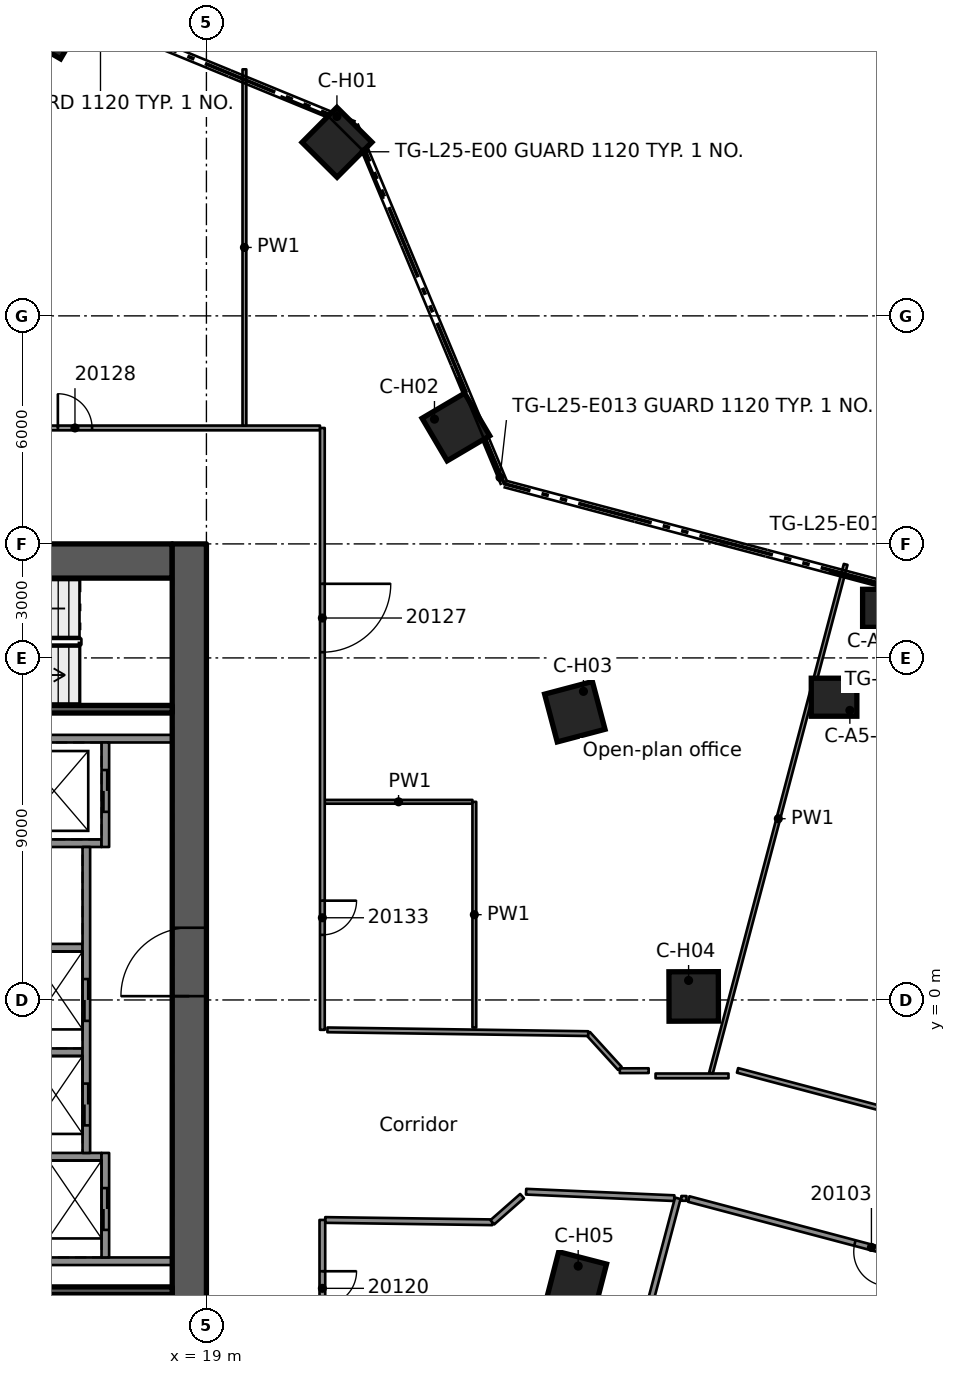
"""IFC4 building model, lengths in metres.
Left out: names, types, materials, properties, quantities, classifications, styles, units other than length and angle.
Written with IfcOpenShell. Run it as: python <this file> out.ifc"""

import sys

from ifc_helpers import new_model, si_unit, direction, frame, frame_2d, origin, origin_2d, place, context, subcontext, project, spatial, rectangle, extrude, element, fill, save


model = new_model("IFC4")
c1 = context("Model", 3, precision=1e-05, world=origin(), true_north=direction((0.0, 1.0)))
c2 = subcontext(c1, "Body", "Model", "MODEL_VIEW")
j1 = project(units=[si_unit("LENGTHUNIT", "METRE"), si_unit("PLANEANGLEUNIT", "RADIAN")], contexts=[c1])
p1 = place(None, origin())
s1 = spatial("IfcSite", under=j1, at=p1, CompositionType="ELEMENT")
p2 = place(p1, origin())
s2 = spatial("IfcBuilding", under=s1, at=p2, CompositionType="ELEMENT")
p3 = place(p2, frame((0.0, 0.0, 102.2)))
s3 = spatial("IfcBuildingStorey", under=s2, at=p3, CompositionType="ELEMENT", Elevation=102.2)
p4 = place(p3, frame((8.9, 11.55, 0.0), z_axis=(0.0, 0.0, 1.0), x_axis=(1.0, 0.0, 0.0)))
e1 = element("IfcWall", 1, at=p4, inside=s3, PredefinedType="SHEAR", context=c2, shape_type="SweptSolid", body=[
    extrude(rectangle(XDim=9.2, YDim=0.9, at=frame_2d((4.6, 0.0))), origin(), (0.0, 0.0, 1.0), 3.5),
])
p5 = place(p4, frame((3.0, 0.0, 0.0)))
e2 = element("IfcOpeningElement", 2, at=p5, cuts=e1, PredefinedType="OPENING", context=c2, shape_type="SweptSolid", body=[
    extrude(rectangle(XDim=1.1, YDim=2.1, at=frame_2d((0.55, 1.05))), frame((0.0, 0.46, 0.0), z_axis=(0.0, -1.0, 0.0), x_axis=(1.0, 0.0, 0.0)), (0.0, 0.0, 1.0), 0.92),
])
p6 = place(p3, frame((18.55, -12.0, 0.0), z_axis=(0.0, 0.0, 1.0), x_axis=(0.0, 1.0, 0.0)))
e3 = element("IfcWall", 3, at=p6, inside=s3, PredefinedType="SHEAR", context=c2, shape_type="SweptSolid", body=[
    extrude(rectangle(XDim=24.0, YDim=0.9, at=frame_2d((12.0, 0.0))), origin(), (0.0, 0.0, 1.0), 3.5),
])
p7 = place(p6, frame((12.1, 0.0, 0.0)))
e4 = element("IfcOpeningElement", 4, at=p7, cuts=e3, PredefinedType="OPENING", context=c2, shape_type="SweptSolid", body=[
    extrude(rectangle(XDim=1.8, YDim=2.1, at=frame_2d((0.9, 1.05))), frame((0.0, 0.46, 0.0), z_axis=(0.0, -1.0, 0.0), x_axis=(1.0, 0.0, 0.0)), (0.0, 0.0, 1.0), 0.92),
])
for number, where, z_axis, x_axis in (
    (5, (36.867, 10.305, 0.0), (0.0, 0.0, 1.0), (1.0, 0.0, 0.0)),
    (6, (35.516, 7.966, 0.0), (0.0, 0.0, 1.0), (1.0, 0.0, 0.0)),
):
    element("IfcColumn", number, at=place(p3, frame(where, z_axis=z_axis, x_axis=x_axis)), inside=s3, PredefinedType="COLUMN", context=c2, shape_type="SweptSolid", body=[
        extrude(rectangle(XDim=1.2, YDim=1.0, at=origin_2d()), origin(), (0.0, 0.0, 1.0), 3.5),
    ])
for number, where, z_axis, x_axis in (
    (7, (22.436, 22.567, 0.0), (0.0, 0.0, 1.0), (0.705, 0.709, 0.0)),
    (8, (25.565, 15.076, 0.0), (0.0, 0.0, 1.0), (0.861, 0.508, 0.0)),
    (9, (28.694, 7.584, 0.0), (0.0, 0.0, 1.0), (0.967, 0.256, 0.0)),
    (10, (31.822, 0.093, 0.0), (0.0, 0.0, 1.0), (1.0, 0.003, 0.0)),
    (11, (28.737, -7.417, 0.0), (0.0, 0.0, 1.0), (0.968, -0.25, 0.0)),
    (12, (14.927, 25.652, 0.0), (0.0, 0.0, 1.0), (0.503, 0.864, 0.0)),
):
    element("IfcColumn", number, at=place(p3, frame(where, z_axis=z_axis, x_axis=x_axis)), inside=s3, PredefinedType="COLUMN", context=c2, shape_type="SweptSolid", body=[
        extrude(rectangle(XDim=1.3, YDim=1.3, at=origin_2d()), origin(), (0.0, 0.0, 1.0), 3.5),
    ])
for number, where, z_axis, x_axis in (
    (13, (11.54, -6.875, 0.0), (0.0, 0.0, 1.0), (1.0, 0.0, 0.0)),
    (14, (11.54, 6.875, 0.0), (0.0, 0.0, 1.0), (1.0, 0.0, 0.0)),
):
    element("IfcWall", number, at=place(p3, frame(where, z_axis=z_axis, x_axis=x_axis)), inside=s3, PredefinedType="SOLIDWALL", context=c2, shape_type="SweptSolid", body=[
        extrude(rectangle(XDim=6.56, YDim=0.2, at=frame_2d((3.28, 0.0))), origin(), (0.0, 0.0, 1.0), 3.09),
    ])
p8 = place(p3, frame((11.54, 4.125, 0.0), z_axis=(0.0, 0.0, 1.0), x_axis=(1.0, 0.0, 0.0)))
e15 = element("IfcWall", 15, at=p8, inside=s3, PredefinedType="SOLIDWALL", context=c2, shape_type="SweptSolid", body=[
    extrude(rectangle(XDim=4.7, YDim=0.2, at=frame_2d((2.35, 0.0))), origin(), (0.0, 0.0, 1.0), 3.09),
])
for number, where, z_axis, x_axis in (
    (16, (11.54, 1.375, 0.0), (0.0, 0.0, 1.0), (1.0, 0.0, 0.0)),
    (17, (11.54, -1.375, 0.0), (0.0, 0.0, 1.0), (1.0, 0.0, 0.0)),
):
    element("IfcWall", number, at=place(p3, frame(where, z_axis=z_axis, x_axis=x_axis)), inside=s3, PredefinedType="SOLIDWALL", context=c2, shape_type="SweptSolid", body=[
        extrude(rectangle(XDim=4.2, YDim=0.2, at=frame_2d((2.1, 0.0))), origin(), (0.0, 0.0, 1.0), 3.09),
    ])
p9 = place(p3, frame((11.54, -4.125, 0.0), z_axis=(0.0, 0.0, 1.0), x_axis=(1.0, 0.0, 0.0)))
e18 = element("IfcWall", 18, at=p9, inside=s3, PredefinedType="SOLIDWALL", context=c2, shape_type="SweptSolid", body=[
    extrude(rectangle(XDim=4.7, YDim=0.2, at=frame_2d((2.35, 0.0))), origin(), (0.0, 0.0, 1.0), 3.09),
])
p10 = place(p3, frame((16.34, 6.775, 0.0), z_axis=(0.0, 0.0, 1.0), x_axis=(0.0, -1.0, 0.0)))
e19 = element("IfcWall", 19, at=p10, inside=s3, PredefinedType="SOLIDWALL", context=c2, shape_type="SweptSolid", body=[
    extrude(rectangle(XDim=2.75, YDim=0.2, at=frame_2d((1.375, 0.0))), origin(), (0.0, 0.0, 1.0), 3.09),
])
p11 = place(p10, frame((0.725, 0.0, 0.0)))
e20 = element("IfcOpeningElement", 20, at=p11, cuts=e19, PredefinedType="OPENING", context=c2, shape_type="SweptSolid", body=[
    extrude(rectangle(XDim=1.1, YDim=2.1, at=frame_2d((0.55, 1.05))), frame((0.0, 0.11, 0.0), z_axis=(0.0, -1.0, 0.0), x_axis=(1.0, 0.0, 0.0)), (0.0, 0.0, 1.0), 0.22),
])
p12 = place(p3, frame((15.84, 4.025, 0.0), z_axis=(0.0, 0.0, 1.0), x_axis=(0.0, -1.0, 0.0)))
e21 = element("IfcWall", 21, at=p12, inside=s3, PredefinedType="SOLIDWALL", context=c2, shape_type="SweptSolid", body=[
    extrude(rectangle(XDim=8.05, YDim=0.2, at=frame_2d((4.025, 0.0))), origin(), (0.0, 0.0, 1.0), 3.09),
])
p13 = place(p12, frame((3.475, 0.0, 0.0)))
e22 = element("IfcOpeningElement", 22, at=p13, cuts=e21, PredefinedType="OPENING", context=c2, shape_type="SweptSolid", body=[
    extrude(rectangle(XDim=1.1, YDim=2.1, at=frame_2d((0.55, 1.05))), frame((0.0, 0.11, 0.0), z_axis=(0.0, -1.0, 0.0), x_axis=(1.0, 0.0, 0.0)), (0.0, 0.0, 1.0), 0.22),
])
p14 = place(p12, frame((6.225, 0.0, 0.0)))
e23 = element("IfcOpeningElement", 23, at=p14, cuts=e21, PredefinedType="OPENING", context=c2, shape_type="SweptSolid", body=[
    extrude(rectangle(XDim=1.1, YDim=2.1, at=frame_2d((0.55, 1.05))), frame((0.0, 0.11, 0.0), z_axis=(0.0, -1.0, 0.0), x_axis=(1.0, 0.0, 0.0)), (0.0, 0.0, 1.0), 0.22),
])
p15 = place(p3, frame((16.34, -4.025, 0.0), z_axis=(0.0, 0.0, 1.0), x_axis=(0.0, -1.0, 0.0)))
e24 = element("IfcWall", 24, at=p15, inside=s3, PredefinedType="SOLIDWALL", context=c2, shape_type="SweptSolid", body=[
    extrude(rectangle(XDim=2.75, YDim=0.2, at=frame_2d((1.375, 0.0))), origin(), (0.0, 0.0, 1.0), 3.09),
])
p16 = place(p15, frame((0.925, 0.0, 0.0)))
e25 = element("IfcOpeningElement", 25, at=p16, cuts=e24, PredefinedType="OPENING", context=c2, shape_type="SweptSolid", body=[
    extrude(rectangle(XDim=1.1, YDim=2.1, at=frame_2d((0.55, 1.05))), frame((0.0, 0.11, 0.0), z_axis=(0.0, -1.0, 0.0), x_axis=(1.0, 0.0, 0.0)), (0.0, 0.0, 1.0), 0.22),
])
for number, where, z_axis, x_axis in (
    (26, (11.54, -7.65, 0.0), (0.0, 0.0, 1.0), (1.0, 0.0, 0.0)),
    (27, (11.54, 7.65, 0.0), (0.0, 0.0, 1.0), (1.0, 0.0, 0.0)),
):
    element("IfcWall", number, at=place(p3, frame(where, z_axis=z_axis, x_axis=x_axis)), inside=s3, PredefinedType="SOLIDWALL", context=c2, shape_type="SweptSolid", body=[
        extrude(rectangle(XDim=6.56, YDim=0.2, at=frame_2d((3.28, 0.0))), origin(), (0.0, 0.0, 1.0), 3.09),
    ])
p17 = place(p3, frame((29.879, -1.8, 0.0), z_axis=(0.0, 0.0, 1.0), x_axis=(-0.673036517664, 0.739609252167, 0.0)))
e28 = element("IfcWall", 28, at=p17, inside=s3, PredefinedType="PARTITIONING", context=c2, shape_type="SweptSolid", body=[
    extrude(rectangle(XDim=1.236, YDim=0.125, at=frame_2d((0.618, 0.0))), origin(), (0.0, 0.0, 1.0), 3.08),
])
p18 = place(p3, frame((52.134, -10.652, 0.0), z_axis=(0.0, 0.0, 1.0), x_axis=(-0.966671200414, 0.25602107392, 0.0)))
e29 = element("IfcWall", 29, at=p18, inside=s3, PredefinedType="PARTITIONING", context=c2, shape_type="SweptSolid", body=[
    extrude(rectangle(XDim=21.147, YDim=0.15, at=frame_2d((10.573, 0.0))), origin(), (0.0, 0.0, 1.0), 3.08),
])
p19 = place(p18, frame((15.724, 0.0, 0.0)))
e30 = element("IfcOpeningElement", 30, at=p19, cuts=e29, PredefinedType="OPENING", context=c2, shape_type="SweptSolid", body=[
    extrude(rectangle(XDim=0.9, YDim=2.1, at=frame_2d((0.45, 1.05))), frame((0.0, 0.085, 0.0), z_axis=(0.0, -1.0, 0.0), x_axis=(1.0, 0.0, 0.0)), (0.0, 0.0, 1.0), 0.17),
])
p20 = place(p18, frame((6.324, 0.0, 0.0)))
e31 = element("IfcOpeningElement", 31, at=p20, cuts=e29, PredefinedType="OPENING", context=c2, shape_type="SweptSolid", body=[
    extrude(rectangle(XDim=0.9, YDim=2.1, at=frame_2d((0.45, 1.05))), frame((0.0, 0.085, 0.0), z_axis=(0.0, -1.0, 0.0), x_axis=(1.0, 0.0, 0.0)), (0.0, 0.0, 1.0), 0.17),
])
p21 = place(p3, frame((32.976, -1.853, 0.0), z_axis=(0.0, 0.0, 1.0), x_axis=(0.966679949131, -0.255988038682, 0.0)))
e32 = element("IfcWall", 32, at=p21, inside=s3, PredefinedType="PARTITIONING", context=c2, shape_type="SweptSolid", body=[
    extrude(rectangle(XDim=24.387, YDim=0.125, at=frame_2d((12.194, 0.0))), origin(), (0.0, 0.0, 1.0), 3.08),
])
p22 = place(p21, frame((3.85, 0.0, 0.0)))
e33 = element("IfcOpeningElement", 33, at=p22, cuts=e32, PredefinedType="OPENING", context=c2, shape_type="SweptSolid", body=[
    extrude(rectangle(XDim=1.8, YDim=2.1, at=frame_2d((0.9, 1.05))), frame((0.0, 0.073, 0.0), z_axis=(0.0, -1.0, 0.0), x_axis=(1.0, 0.0, 0.0)), (0.0, 0.0, 1.0), 0.145),
])
p23 = place(p21, frame((13.499, 0.0, 0.0)))
e34 = element("IfcOpeningElement", 34, at=p23, cuts=e32, PredefinedType="OPENING", context=c2, shape_type="SweptSolid", body=[
    extrude(rectangle(XDim=1.1, YDim=2.1, at=frame_2d((0.55, 1.05))), frame((0.0, 0.073, 0.0), z_axis=(0.0, -1.0, 0.0), x_axis=(1.0, 0.0, 0.0)), (0.0, 0.0, 1.0), 0.145),
])
p24 = place(p3, frame((27.412, -5.045, 0.0), z_axis=(0.0, 0.0, 1.0), x_axis=(0.999048944575, -0.043602824945, 0.0)))
e35 = element("IfcWall", 35, at=p24, inside=s3, PredefinedType="PARTITIONING", context=c2, shape_type="SweptSolid", body=[
    extrude(rectangle(XDim=3.903, YDim=0.15, at=frame_2d((1.951, 0.0))), origin(), (0.0, 0.0, 1.0), 3.08),
])
p25 = place(p3, frame((22.126, -5.789, 0.0), z_axis=(0.0, 0.0, 1.0), x_axis=(0.999903670382, -0.013879839955, 0.0)))
e36 = element("IfcWall", 36, at=p25, inside=s3, PredefinedType="PARTITIONING", context=c2, shape_type="SweptSolid", body=[
    extrude(rectangle(XDim=4.397, YDim=0.15, at=frame_2d((2.199, 0.0))), origin(), (0.0, 0.0, 1.0), 3.08),
])
p26 = place(p3, frame((31.497, -5.22, 0.0), z_axis=(0.0, 0.0, 1.0), x_axis=(0.999895375943, -0.014465032563, 0.0)))
e37 = element("IfcWall", 37, at=p26, inside=s3, PredefinedType="PARTITIONING", context=c2, shape_type="SweptSolid", body=[
    extrude(rectangle(XDim=0.135, YDim=0.125, at=frame_2d((0.067, 0.0))), origin(), (0.0, 0.0, 1.0), 3.08),
])
p27 = place(p3, frame((22.184, -0.787, 0.0), z_axis=(0.0, 0.0, 1.0), x_axis=(0.999896232857, -0.014405676579, 0.0)))
e38 = element("IfcWall", 38, at=p27, inside=s3, PredefinedType="PARTITIONING", context=c2, shape_type="SweptSolid", body=[
    extrude(rectangle(XDim=6.864, YDim=0.125, at=frame_2d((3.432, 0.0))), origin(), (0.0, 0.0, 1.0), 3.08),
])
p28 = place(p3, frame((30.819, -1.998, 0.0), z_axis=(0.0, 0.0, 1.0), x_axis=(1.0, 0.0, 0.0)))
e39 = element("IfcWall", 39, at=p28, inside=s3, PredefinedType="PARTITIONING", context=c2, shape_type="SweptSolid", body=[
    extrude(rectangle(XDim=1.919, YDim=0.125, at=frame_2d((0.959, 0.0))), origin(), (0.0, 0.0, 1.0), 3.08),
])
p29 = place(p3, frame((22.113, 5.214, 0.0), z_axis=(0.0, 0.0, 1.0), x_axis=(1.0, 0.0, 0.0)))
e40 = element("IfcWall", 40, at=p29, inside=s3, PredefinedType="PARTITIONING", context=c2, shape_type="SweptSolid", body=[
    extrude(rectangle(XDim=3.886, YDim=0.1, at=frame_2d((1.943, 0.0))), origin(), (0.0, 0.0, 1.0), 3.08),
])
p30 = place(p3, frame((10.991, 15.051, 0.0), z_axis=(0.0, 0.0, 1.0), x_axis=(1.0, 0.0, 0.0)))
e41 = element("IfcWall", 41, at=p30, inside=s3, PredefinedType="PARTITIONING", context=c2, shape_type="SweptSolid", body=[
    extrude(rectangle(XDim=10.997, YDim=0.125, at=frame_2d((5.499, 0.0))), origin(), (0.0, 0.0, 1.0), 3.08),
])
p31 = place(p30, frame((4.1, 0.0, 0.0)))
e42 = element("IfcOpeningElement", 42, at=p31, cuts=e41, PredefinedType="OPENING", context=c2, shape_type="SweptSolid", body=[
    extrude(rectangle(XDim=0.9, YDim=2.1, at=frame_2d((0.45, 1.05))), frame((0.0, 0.073, 0.0), z_axis=(0.0, -1.0, 0.0), x_axis=(1.0, 0.0, 0.0)), (0.0, 0.0, 1.0), 0.145),
])
p32 = place(p3, frame((29.878, -1.862, 0.0), z_axis=(0.0, 0.0, 1.0), x_axis=(0.999996689403, 0.002573166135, 0.0)))
e43 = element("IfcWall", 43, at=p32, inside=s3, PredefinedType="PARTITIONING", context=c2, shape_type="SweptSolid", body=[
    extrude(rectangle(XDim=0.759, YDim=0.125, at=frame_2d((0.379, 0.0))), origin(), (0.0, 0.0, 1.0), 3.08),
])
p33 = place(p3, frame((29.858, -11.053, 0.0), z_axis=(0.0, 0.0, 1.0), x_axis=(0.256179404859, 0.966629252882, 0.0)))
e44 = element("IfcWall", 44, at=p33, inside=s3, PredefinedType="PARTITIONING", context=c2, shape_type="SweptSolid", body=[
    extrude(rectangle(XDim=6.035, YDim=0.15, at=frame_2d((3.018, 0.0))), origin(), (0.0, 0.0, 1.0), 3.08),
])
p34 = place(p3, frame((32.277, -1.923, 0.0), z_axis=(0.0, 0.0, 1.0), x_axis=(0.255967683611, 0.96668533916, 0.0)))
e45 = element("IfcWall", 45, at=p34, inside=s3, PredefinedType="PARTITIONING", context=c2, shape_type="SweptSolid", body=[
    extrude(rectangle(XDim=13.845, YDim=0.1, at=frame_2d((6.923, 0.0))), origin(), (0.0, 0.0, 1.0), 3.08),
])
p35 = place(p3, frame((26.523, -5.85, 0.0), z_axis=(0.0, 0.0, 1.0), x_axis=(0.750616003207, 0.660738689446, 0.0)))
e46 = element("IfcWall", 46, at=p35, inside=s3, PredefinedType="PARTITIONING", context=c2, shape_type="SweptSolid", body=[
    extrude(rectangle(XDim=1.043, YDim=0.15, at=frame_2d((0.521, 0.0))), origin(), (0.0, 0.0, 1.0), 3.08),
])
p36 = place(p3, frame((26.05, -0.725, 0.0), z_axis=(0.0, 0.0, 1.0), x_axis=(0.0, 1.0, 0.0)))
e47 = element("IfcWall", 47, at=p36, inside=s3, PredefinedType="PARTITIONING", context=c2, shape_type="SweptSolid", body=[
    extrude(rectangle(XDim=5.938, YDim=0.1, at=frame_2d((2.969, 0.0))), origin(), (0.0, 0.0, 1.0), 3.08),
])
p37 = place(p3, frame((22.051, -5.788, 0.0), z_axis=(0.0, 0.0, 1.0), x_axis=(0.0, -1.0, 0.0)))
e48 = element("IfcWall", 48, at=p37, inside=s3, PredefinedType="PARTITIONING", context=c2, shape_type="SweptSolid", body=[
    extrude(rectangle(XDim=3.588, YDim=0.15, at=frame_2d((1.794, 0.0))), origin(), (0.0, 0.0, 1.0), 3.08),
])
p38 = place(p37, frame((1.35, 0.0, 0.0)))
e49 = element("IfcOpeningElement", 49, at=p38, cuts=e48, PredefinedType="OPENING", context=c2, shape_type="SweptSolid", body=[
    extrude(rectangle(XDim=0.9, YDim=2.1, at=frame_2d((0.45, 1.05))), frame((0.0, 0.085, 0.0), z_axis=(0.0, -1.0, 0.0), x_axis=(1.0, 0.0, 0.0)), (0.0, 0.0, 1.0), 0.17),
])
p39 = place(p3, frame((22.051, 15.05, 0.0), z_axis=(0.0, 0.0, 1.0), x_axis=(0.0, -1.0, 0.0)))
e50 = element("IfcWall", 50, at=p39, inside=s3, PredefinedType="PARTITIONING", context=c2, shape_type="SweptSolid", body=[
    extrude(rectangle(XDim=15.836, YDim=0.125, at=frame_2d((7.918, 0.0))), origin(), (0.0, 0.0, 1.0), 3.08),
])
p40 = place(p39, frame((4.1, 0.0, 0.0)))
e51 = element("IfcOpeningElement", 51, at=p40, cuts=e50, PredefinedType="OPENING", context=c2, shape_type="SweptSolid", body=[
    extrude(rectangle(XDim=1.8, YDim=2.1, at=frame_2d((0.9, 1.05))), frame((0.0, 0.073, 0.0), z_axis=(0.0, -1.0, 0.0), x_axis=(1.0, 0.0, 0.0)), (0.0, 0.0, 1.0), 0.145),
])
p41 = place(p39, frame((12.437, 0.0, 0.0)))
e52 = element("IfcOpeningElement", 52, at=p41, cuts=e50, PredefinedType="OPENING", context=c2, shape_type="SweptSolid", body=[
    extrude(rectangle(XDim=0.9, YDim=2.1, at=frame_2d((0.45, 1.05))), frame((0.0, 0.073, 0.0), z_axis=(0.0, -1.0, 0.0), x_axis=(1.0, 0.0, 0.0)), (0.0, 0.0, 1.0), 0.145),
])
p42 = place(p3, frame((20.0, 15.114, 0.0), z_axis=(0.0, 0.0, 1.0), x_axis=(0.0, 1.0, 0.0)))
e53 = element("IfcWall", 53, at=p42, inside=s3, PredefinedType="PARTITIONING", context=c2, shape_type="SweptSolid", body=[
    extrude(rectangle(XDim=9.373, YDim=0.1, at=frame_2d((4.687, 0.0))), origin(), (0.0, 0.0, 1.0), 3.08),
])
p43 = place(p11, origin())
e54 = element("IfcDoor", 54, at=p43, inside=s3, OperationType="DOUBLE_DOOR_SLIDING", PredefinedType="DOOR", context=c2, shape_type="SweptSolid", body=[
    extrude(rectangle(XDim=1.1, YDim=2.1, at=frame_2d((0.55, 1.05))), frame((0.0, 0.025, 0.0), z_axis=(0.0, -1.0, 0.0), x_axis=(1.0, 0.0, 0.0)), (0.0, 0.0, 1.0), 0.05),
])
fill(e20, e54)
p44 = place(p13, origin())
e55 = element("IfcDoor", 55, at=p44, inside=s3, OperationType="DOUBLE_DOOR_SLIDING", PredefinedType="DOOR", context=c2, shape_type="SweptSolid", body=[
    extrude(rectangle(XDim=1.1, YDim=2.1, at=frame_2d((0.55, 1.05))), frame((0.0, 0.025, 0.0), z_axis=(0.0, -1.0, 0.0), x_axis=(1.0, 0.0, 0.0)), (0.0, 0.0, 1.0), 0.05),
])
fill(e22, e55)
p45 = place(p14, origin())
e56 = element("IfcDoor", 56, at=p45, inside=s3, OperationType="DOUBLE_DOOR_SLIDING", PredefinedType="DOOR", context=c2, shape_type="SweptSolid", body=[
    extrude(rectangle(XDim=1.1, YDim=2.1, at=frame_2d((0.55, 1.05))), frame((0.0, 0.025, 0.0), z_axis=(0.0, -1.0, 0.0), x_axis=(1.0, 0.0, 0.0)), (0.0, 0.0, 1.0), 0.05),
])
fill(e23, e56)
p46 = place(p16, origin())
e57 = element("IfcDoor", 57, at=p46, inside=s3, OperationType="DOUBLE_DOOR_SLIDING", PredefinedType="DOOR", context=c2, shape_type="SweptSolid", body=[
    extrude(rectangle(XDim=1.1, YDim=2.1, at=frame_2d((0.55, 1.05))), frame((0.0, 0.025, 0.0), z_axis=(0.0, -1.0, 0.0), x_axis=(1.0, 0.0, 0.0)), (0.0, 0.0, 1.0), 0.05),
])
fill(e25, e57)
p47 = place(p7, origin())
e58 = element("IfcDoor", 58, at=p47, inside=s3, OperationType="SINGLE_SWING_RIGHT", PredefinedType="DOOR", context=c2, shape_type="SweptSolid", body=[
    extrude(rectangle(XDim=1.8, YDim=2.1, at=frame_2d((0.9, 1.05))), frame((0.0, 0.025, 0.0), z_axis=(0.0, -1.0, 0.0), x_axis=(1.0, 0.0, 0.0)), (0.0, 0.0, 1.0), 0.05),
])
fill(e4, e58)
p48 = place(p19, origin())
e59 = element("IfcDoor", 59, at=p48, inside=s3, OperationType="SINGLE_SWING_RIGHT", PredefinedType="DOOR", context=c2, shape_type="SweptSolid", body=[
    extrude(rectangle(XDim=0.9, YDim=2.1, at=frame_2d((0.45, 1.05))), frame((0.0, 0.025, 0.0), z_axis=(0.0, -1.0, 0.0), x_axis=(1.0, 0.0, 0.0)), (0.0, 0.0, 1.0), 0.05),
])
fill(e30, e59)
p49 = place(p38, origin())
e60 = element("IfcDoor", 60, at=p49, inside=s3, OperationType="SINGLE_SWING_RIGHT", PredefinedType="DOOR", context=c2, shape_type="SweptSolid", body=[
    extrude(rectangle(XDim=0.9, YDim=2.1, at=frame_2d((0.45, 1.05))), frame((0.0, 0.025, 0.0), z_axis=(0.0, -1.0, 0.0), x_axis=(1.0, 0.0, 0.0)), (0.0, 0.0, 1.0), 0.05),
])
fill(e49, e60)
p50 = place(p40, origin())
e61 = element("IfcDoor", 61, at=p50, inside=s3, OperationType="DOUBLE_DOOR_SINGLE_SWING", PredefinedType="DOOR", context=c2, shape_type="SweptSolid", body=[
    extrude(rectangle(XDim=1.8, YDim=2.1, at=frame_2d((0.9, 1.05))), frame((0.0, 0.025, 0.0), z_axis=(0.0, -1.0, 0.0), x_axis=(1.0, 0.0, 0.0)), (0.0, 0.0, 1.0), 0.05),
])
fill(e51, e61)
p51 = place(p31, origin())
e62 = element("IfcDoor", 62, at=p51, inside=s3, OperationType="SINGLE_SWING_LEFT", PredefinedType="DOOR", context=c2, shape_type="SweptSolid", body=[
    extrude(rectangle(XDim=0.9, YDim=2.1, at=frame_2d((0.45, 1.05))), frame((0.0, 0.025, 0.0), z_axis=(0.0, -1.0, 0.0), x_axis=(1.0, 0.0, 0.0)), (0.0, 0.0, 1.0), 0.05),
])
fill(e42, e62)
p52 = place(p41, origin())
e63 = element("IfcDoor", 63, at=p52, inside=s3, OperationType="SINGLE_SWING_RIGHT", PredefinedType="DOOR", context=c2, shape_type="SweptSolid", body=[
    extrude(rectangle(XDim=0.9, YDim=2.1, at=frame_2d((0.45, 1.05))), frame((0.0, 0.025, 0.0), z_axis=(0.0, -1.0, 0.0), x_axis=(1.0, 0.0, 0.0)), (0.0, 0.0, 1.0), 0.05),
])
fill(e52, e63)
save(model, sys.argv[1])
